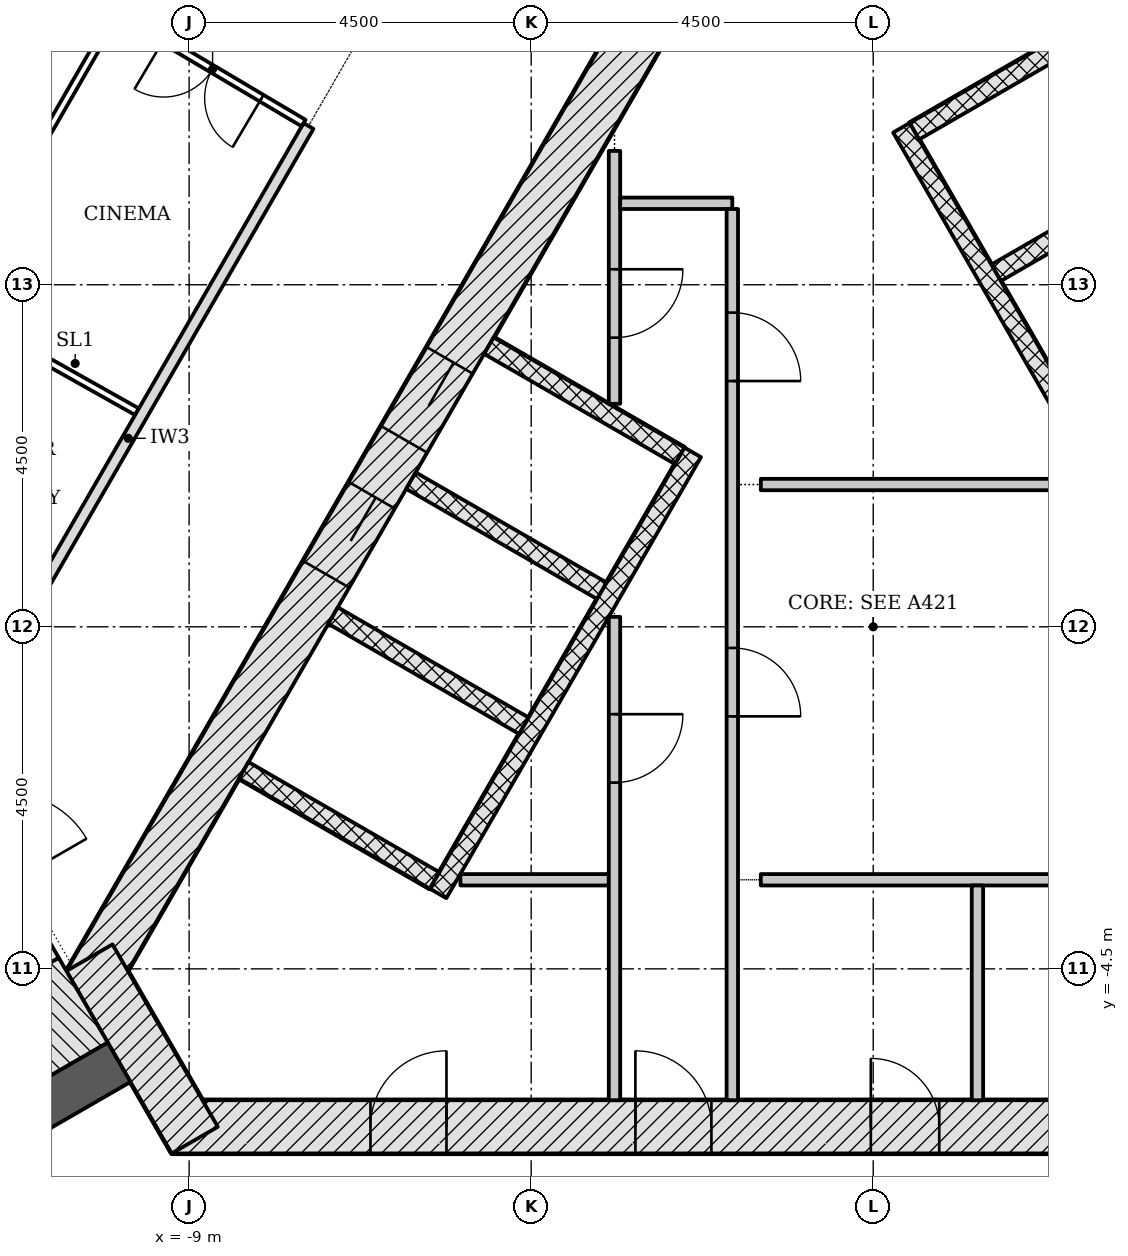
"""IFC4 building model, lengths in metres.
Left out: names, types, materials, properties, quantities, classifications, styles, units other than length and angle.
Written with IfcOpenShell. Run it as: python <this file> out.ifc"""

import sys

from ifc_helpers import new_model, si_unit, direction, frame, frame_2d, origin, place, context, subcontext, project, spatial, rectangle, extrude, element, fill, save


model = new_model("IFC4")
c1 = context("Model", 3, precision=1e-05, world=origin(), true_north=direction((0.0, 1.0)))
c2 = subcontext(c1, "Body", "Model", "MODEL_VIEW")
j1 = project(units=[si_unit("LENGTHUNIT", "METRE"), si_unit("PLANEANGLEUNIT", "RADIAN")], contexts=[c1])
p1 = place(None, origin())
s1 = spatial("IfcSite", under=j1, at=p1, CompositionType="ELEMENT")
p2 = place(p1, origin())
s2 = spatial("IfcBuilding", under=s1, at=p2, CompositionType="ELEMENT")
p3 = place(p2, frame((0.0, 0.0, 263.4)))
s3 = spatial("IfcBuildingStorey", under=s2, at=p3, CompositionType="ELEMENT", Elevation=263.4)
p4 = place(p3, frame((-9.229, -6.578, -0.2), z_axis=(0.0, 0.0, 1.0), x_axis=(1.0, 0.0, 0.0)))
e1 = element("IfcWall", 1, at=p4, inside=s3, PredefinedType="SHEAR", context=c2, shape_type="SweptSolid", body=[
    extrude(rectangle(XDim=18.458, YDim=0.7, at=frame_2d((9.229, 0.0))), origin(), (0.0, 0.0, 1.0), 3.6),
])
p5 = place(p4, frame((6.1, 0.0, 0.2)))
e2 = element("IfcOpeningElement", 2, at=p5, cuts=e1, PredefinedType="OPENING", context=c2, shape_type="SweptSolid", body=[
    extrude(rectangle(XDim=1.0, YDim=2.1, at=frame_2d((0.5, 1.05))), frame((0.0, 0.36, 0.0), z_axis=(0.0, -1.0, 0.0), x_axis=(1.0, 0.0, 0.0)), (0.0, 0.0, 1.0), 0.72),
])
p6 = place(p4, frame((2.615, 0.0, 0.2)))
e3 = element("IfcOpeningElement", 3, at=p6, cuts=e1, PredefinedType="OPENING", context=c2, shape_type="SweptSolid", body=[
    extrude(rectangle(XDim=1.0, YDim=2.1, at=frame_2d((0.5, 1.05))), frame((0.0, 0.36, 0.0), z_axis=(0.0, -1.0, 0.0), x_axis=(1.0, 0.0, 0.0)), (0.0, 0.0, 1.0), 0.72),
])
p7 = place(p4, frame((9.198, 0.0, 0.2)))
e4 = element("IfcOpeningElement", 4, at=p7, cuts=e1, PredefinedType="OPENING", context=c2, shape_type="SweptSolid", body=[
    extrude(rectangle(XDim=0.9, YDim=2.1, at=frame_2d((0.45, 1.05))), frame((0.0, 0.36, 0.0), z_axis=(0.0, -1.0, 0.0), x_axis=(1.0, 0.0, 0.0)), (0.0, 0.0, 1.0), 0.72),
])
p8 = place(p4, frame((13.877, 0.0, 0.2)))
e5 = element("IfcOpeningElement", 5, at=p8, cuts=e1, PredefinedType="OPENING", context=c2, shape_type="SweptSolid", body=[
    extrude(rectangle(XDim=0.9, YDim=2.1, at=frame_2d((0.45, 1.05))), frame((0.0, 0.36, 0.0), z_axis=(0.0, -1.0, 0.0), x_axis=(1.0, 0.0, 0.0)), (0.0, 0.0, 1.0), 0.72),
])
p9 = place(p3, frame((10.311, -4.703, -0.2), z_axis=(0.0, 0.0, 1.0), x_axis=(-0.500001446645, 0.866024568562, 0.0)))
e6 = element("IfcWall", 6, at=p9, inside=s3, PredefinedType="SHEAR", context=c2, shape_type="SweptSolid", body=[
    extrude(rectangle(XDim=18.458, YDim=0.7, at=frame_2d((9.229, 0.0))), origin(), (0.0, 0.0, 1.0), 3.6),
])
p10 = place(p9, frame((4.379, 0.0, 0.2)))
e7 = element("IfcOpeningElement", 7, at=p10, cuts=e6, PredefinedType="OPENING", context=c2, shape_type="SweptSolid", body=[
    extrude(rectangle(XDim=1.1, YDim=2.1, at=frame_2d((0.55, 1.05))), frame((0.0, 0.36, 0.0), z_axis=(0.0, -1.0, 0.0), x_axis=(1.0, 0.0, 0.0)), (0.0, 0.0, 1.0), 0.72),
])
p11 = place(p9, frame((6.529, 0.0, 0.2)))
e8 = element("IfcOpeningElement", 8, at=p11, cuts=e6, PredefinedType="OPENING", context=c2, shape_type="SweptSolid", body=[
    extrude(rectangle(XDim=1.1, YDim=2.1, at=frame_2d((0.55, 1.05))), frame((0.0, 0.36, 0.0), z_axis=(0.0, -1.0, 0.0), x_axis=(1.0, 0.0, 0.0)), (0.0, 0.0, 1.0), 0.72),
])
p12 = place(p9, frame((8.679, 0.0, 0.2)))
e9 = element("IfcOpeningElement", 9, at=p12, cuts=e6, PredefinedType="OPENING", context=c2, shape_type="SweptSolid", body=[
    extrude(rectangle(XDim=1.1, YDim=2.1, at=frame_2d((0.55, 1.05))), frame((0.0, 0.36, 0.0), z_axis=(0.0, -1.0, 0.0), x_axis=(1.0, 0.0, 0.0)), (0.0, 0.0, 1.0), 0.72),
])
p13 = place(p9, frame((10.829, 0.0, 0.2)))
e10 = element("IfcOpeningElement", 10, at=p13, cuts=e6, PredefinedType="OPENING", context=c2, shape_type="SweptSolid", body=[
    extrude(rectangle(XDim=1.1, YDim=2.1, at=frame_2d((0.55, 1.05))), frame((0.0, 0.36, 0.0), z_axis=(0.0, -1.0, 0.0), x_axis=(1.0, 0.0, 0.0)), (0.0, 0.0, 1.0), 0.72),
])
p14 = place(p9, frame((12.979, 0.0, 0.2)))
e11 = element("IfcOpeningElement", 11, at=p14, cuts=e6, PredefinedType="OPENING", context=c2, shape_type="SweptSolid", body=[
    extrude(rectangle(XDim=1.1, YDim=2.1, at=frame_2d((0.55, 1.05))), frame((0.0, 0.36, 0.0), z_axis=(0.0, -1.0, 0.0), x_axis=(1.0, 0.0, 0.0)), (0.0, 0.0, 1.0), 0.72),
])
p15 = place(p3, frame((-1.083, 11.281, -0.2), z_axis=(0.0, 0.0, 1.0), x_axis=(-0.500001446645, -0.866024568562, 0.0)))
e12 = element("IfcWall", 12, at=p15, inside=s3, PredefinedType="SHEAR", context=c2, shape_type="SweptSolid", body=[
    extrude(rectangle(XDim=18.458, YDim=0.7, at=frame_2d((9.229, 0.0))), origin(), (0.0, 0.0, 1.0), 3.6),
])
p16 = place(p15, frame((8.979, 0.0, 0.2)))
e13 = element("IfcOpeningElement", 13, at=p16, cuts=e12, PredefinedType="OPENING", context=c2, shape_type="SweptSolid", body=[
    extrude(rectangle(XDim=1.2, YDim=2.1, at=frame_2d((0.6, 1.05))), frame((0.0, 0.36, 0.0), z_axis=(0.0, -1.0, 0.0), x_axis=(1.0, 0.0, 0.0)), (0.0, 0.0, 1.0), 0.72),
])
p17 = place(p15, frame((11.029, 0.0, 0.2)))
e14 = element("IfcOpeningElement", 14, at=p17, cuts=e12, PredefinedType="OPENING", context=c2, shape_type="SweptSolid", body=[
    extrude(rectangle(XDim=1.2, YDim=2.1, at=frame_2d((0.6, 1.05))), frame((0.0, 0.36, 0.0), z_axis=(0.0, -1.0, 0.0), x_axis=(1.0, 0.0, 0.0)), (0.0, 0.0, 1.0), 0.72),
])
p18 = place(p3, frame((-10.311, -4.353, -0.2), z_axis=(0.0, 0.0, 1.0), x_axis=(0.500042739161, -0.866000726912, 0.0)))
e15 = element("IfcWall", 15, at=p18, inside=s3, PredefinedType="SHEAR", context=c2, shape_type="SweptSolid", body=[
    extrude(rectangle(XDim=2.771, YDim=0.7, at=frame_2d((1.386, 0.0))), origin(), (0.0, 0.0, 1.0), 3.6),
])
p19 = place(p3, frame((-9.922, -5.728, -0.2), z_axis=(0.0, 0.0, 1.0), x_axis=(-0.866032176823, -0.499988268569, 0.0)))
e16 = element("IfcWall", 16, at=p19, inside=s3, PredefinedType="SHEAR", context=c2, shape_type="SweptSolid", body=[
    extrude(rectangle(XDim=6.678, YDim=0.6, at=frame_2d((3.339, 0.0))), origin(), (0.0, 0.0, 1.0), 3.6),
])
for number, where, z_axis, x_axis in (
    (17, (3.781, 5.907, -0.2), (0.0, 0.0, 1.0), (-0.866, -0.5, 0.0)),
    (18, (2.706, 7.769, -0.2), (0.0, 0.0, 1.0), (-0.866, -0.5, 0.0)),
):
    element("IfcWall", number, at=place(p3, frame(where, z_axis=z_axis, x_axis=x_axis)), inside=s3, PredefinedType="PARTITIONING", context=c2, shape_type="SweptSolid", body=[
        extrude(rectangle(XDim=2.5, YDim=0.25, at=frame_2d((1.25, 0.0))), origin(), (0.0, 0.0, 1.0), 3.6),
    ])
p20 = place(p3, frame((5.87, -2.961, 0.0), z_axis=(0.0, 0.0, 1.0), x_axis=(-0.50000615651, 0.866021849293, 0.0)))
e19 = element("IfcWall", 19, at=p20, inside=s3, PredefinedType="PARTITIONING", context=c2, shape_type="SweptSolid", body=[
    extrude(rectangle(XDim=11.0, YDim=0.25, at=frame_2d((5.5, 0.0))), origin(), (0.0, 0.0, 1.0), 3.4),
])
for number, where, z_axis, x_axis in (
    (20, (-5.056, 3.699, -0.2), (0.0, 0.0, 1.0), (0.866, -0.5, 0.0)),
    (21, (-6.081, 1.923, -0.2), (0.0, 0.0, 1.0), (0.866, -0.5, 0.0)),
    (22, (-7.106, 0.148, -0.2), (0.0, 0.0, 1.0), (0.866, -0.5, 0.0)),
    (23, (-8.281, -1.887, -0.2), (0.0, 0.0, 1.0), (0.866, -0.5, 0.0)),
):
    element("IfcWall", number, at=place(p3, frame(where, z_axis=z_axis, x_axis=x_axis)), inside=s3, PredefinedType="PARTITIONING", context=c2, shape_type="SweptSolid", body=[
        extrude(rectangle(XDim=2.9, YDim=0.25, at=frame_2d((1.45, 0.0))), origin(), (0.0, 0.0, 1.0), 3.6),
    ])
p21 = place(p3, frame((-2.374, 2.294, 0.0), z_axis=(0.0, 0.0, 1.0), x_axis=(-0.500003174267, -0.866023571113, 0.0)))
e24 = element("IfcWall", 24, at=p21, inside=s3, PredefinedType="PARTITIONING", context=c2, shape_type="SweptSolid", body=[
    extrude(rectangle(XDim=6.7, YDim=0.25, at=frame_2d((3.35, 0.0))), origin(), (0.0, 0.0, 1.0), 3.4),
])
p22 = place(p3, frame((-5.431, -3.328, 0.0), z_axis=(0.0, 0.0, 1.0), x_axis=(1.0, 0.0, 0.0)))
e25 = element("IfcWall", 25, at=p22, inside=s3, PredefinedType="PARTITIONING", context=c2, shape_type="SweptSolid", body=[
    extrude(rectangle(XDim=1.952, YDim=0.15, at=frame_2d((0.976, 0.0))), origin(), (0.0, 0.0, 1.0), 3.4),
])
p23 = place(p3, frame((-3.404, 0.131, 0.0), z_axis=(0.0, 0.0, 1.0), x_axis=(0.0, -1.0, 0.0)))
e26 = element("IfcWall", 26, at=p23, inside=s3, PredefinedType="PARTITIONING", context=c2, shape_type="SweptSolid", body=[
    extrude(rectangle(XDim=6.359, YDim=0.15, at=frame_2d((3.18, 0.0))), origin(), (0.0, 0.0, 1.0), 3.4),
])
p24 = place(p23, frame((1.281, 0.0, 0.0)))
e27 = element("IfcOpeningElement", 27, at=p24, cuts=e26, PredefinedType="OPENING", context=c2, shape_type="SweptSolid", body=[
    extrude(rectangle(XDim=0.9, YDim=2.1, at=frame_2d((0.45, 1.05))), frame((0.0, 0.085, 0.0), z_axis=(0.0, -1.0, 0.0), x_axis=(1.0, 0.0, 0.0)), (0.0, 0.0, 1.0), 0.17),
])
p25 = place(p3, frame((-3.404, 6.261, 0.0), z_axis=(0.0, 0.0, 1.0), x_axis=(0.0, -1.0, 0.0)))
e28 = element("IfcWall", 28, at=p25, inside=s3, PredefinedType="PARTITIONING", context=c2, shape_type="SweptSolid", body=[
    extrude(rectangle(XDim=3.327, YDim=0.15, at=frame_2d((1.664, 0.0))), origin(), (0.0, 0.0, 1.0), 3.4),
])
p26 = place(p25, frame((1.557, 0.0, 0.0)))
e29 = element("IfcOpeningElement", 29, at=p26, cuts=e28, PredefinedType="OPENING", context=c2, shape_type="SweptSolid", body=[
    extrude(rectangle(XDim=0.9, YDim=2.1, at=frame_2d((0.45, 1.05))), frame((0.0, 0.085, 0.0), z_axis=(0.0, -1.0, 0.0), x_axis=(1.0, 0.0, 0.0)), (0.0, 0.0, 1.0), 0.17),
])
p27 = place(p3, frame((-3.329, 5.572, 0.0), z_axis=(0.0, 0.0, 1.0), x_axis=(1.0, 0.0, 0.0)))
e30 = element("IfcWall", 30, at=p27, inside=s3, PredefinedType="PARTITIONING", context=c2, shape_type="SweptSolid", body=[
    extrude(rectangle(XDim=1.475, YDim=0.15, at=frame_2d((0.737, 0.0))), origin(), (0.0, 0.0, 1.0), 3.4),
])
p28 = place(p3, frame((-1.854, 5.497, 0.0), z_axis=(0.0, 0.0, 1.0), x_axis=(0.0, -1.0, 0.0)))
e31 = element("IfcWall", 31, at=p28, inside=s3, PredefinedType="PARTITIONING", context=c2, shape_type="SweptSolid", body=[
    extrude(rectangle(XDim=11.725, YDim=0.15, at=frame_2d((5.863, 0.0))), origin(), (0.0, 0.0, 1.0), 3.4),
])
p29 = place(p28, frame((5.775, 0.0, 0.0)))
e32 = element("IfcOpeningElement", 32, at=p29, cuts=e31, PredefinedType="OPENING", context=c2, shape_type="SweptSolid", body=[
    extrude(rectangle(XDim=0.9, YDim=2.1, at=frame_2d((0.45, 1.05))), frame((0.0, 0.085, 0.0), z_axis=(0.0, -1.0, 0.0), x_axis=(1.0, 0.0, 0.0)), (0.0, 0.0, 1.0), 0.17),
])
p30 = place(p28, frame((1.364, 0.0, 0.0)))
e33 = element("IfcOpeningElement", 33, at=p30, cuts=e31, PredefinedType="OPENING", context=c2, shape_type="SweptSolid", body=[
    extrude(rectangle(XDim=0.9, YDim=2.1, at=frame_2d((0.45, 1.05))), frame((0.0, 0.085, 0.0), z_axis=(0.0, -1.0, 0.0), x_axis=(1.0, 0.0, 0.0)), (0.0, 0.0, 1.0), 0.17),
])
p31 = place(p3, frame((-1.479, -3.328, 0.0), z_axis=(0.0, 0.0, 1.0), x_axis=(1.0, 0.0, 0.0)))
e34 = element("IfcWall", 34, at=p31, inside=s3, PredefinedType="PARTITIONING", context=c2, shape_type="SweptSolid", body=[
    extrude(rectangle(XDim=10.547, YDim=0.15, at=frame_2d((5.273, 0.0))), origin(), (0.0, 0.0, 1.0), 3.4),
])
p32 = place(p3, frame((-1.479, 1.872, 0.0), z_axis=(0.0, 0.0, 1.0), x_axis=(1.0, 0.0, 0.0)))
e35 = element("IfcWall", 35, at=p32, inside=s3, PredefinedType="PARTITIONING", context=c2, shape_type="SweptSolid", body=[
    extrude(rectangle(XDim=4.369, YDim=0.15, at=frame_2d((2.185, 0.0))), origin(), (0.0, 0.0, 1.0), 3.4),
])
p33 = place(p3, frame((1.371, -3.403, 0.0), z_axis=(0.0, 0.0, 1.0), x_axis=(0.0, -1.0, 0.0)))
e36 = element("IfcWall", 36, at=p33, inside=s3, PredefinedType="PARTITIONING", context=c2, shape_type="SweptSolid", body=[
    extrude(rectangle(XDim=2.825, YDim=0.15, at=frame_2d((1.413, 0.0))), origin(), (0.0, 0.0, 1.0), 3.4),
])
p34 = place(p3, frame((-12.576, -1.331, -0.2), z_axis=(0.0, 0.0, 1.0), x_axis=(0.499970499736, -0.8660424351, 0.0)))
e37 = element("IfcWall", 37, at=p34, inside=s3, PredefinedType="SHEAR", context=c2, shape_type="SweptSolid", body=[
    extrude(rectangle(XDim=3.55, YDim=0.2, at=frame_2d((1.775, 0.0))), origin(), (0.0, 0.0, 1.0), 3.6),
])
p35 = place(p34, frame((1.175, 0.0, 0.2)))
e38 = element("IfcOpeningElement", 38, at=p35, cuts=e37, PredefinedType="OPENING", context=c2, shape_type="SweptSolid", body=[
    extrude(rectangle(XDim=1.2, YDim=2.1, at=frame_2d((0.6, 1.05))), frame((0.0, 0.11, 0.0), z_axis=(0.0, -1.0, 0.0), x_axis=(1.0, 0.0, 0.0)), (0.0, 0.0, 1.0), 0.22),
])
p36 = place(p3, frame((-10.393, -4.912, -0.2), z_axis=(0.0, 0.0, 1.0), x_axis=(-0.866025486527, -0.499999856685, 0.0)))
e39 = element("IfcWall", 39, at=p36, inside=s3, PredefinedType="SHEAR", context=c2, shape_type="SweptSolid", body=[
    extrude(rectangle(XDim=6.679, YDim=1.286, at=frame_2d((3.339, 0.0))), origin(), (0.0, 0.0, 1.0), 3.6),
])
p37 = place(p3, frame((-7.429, 6.589, 0.0), z_axis=(0.0, 0.0, 1.0), x_axis=(-0.499994197604, -0.866028753773, 0.0)))
e40 = element("IfcWall", 40, at=p37, inside=s3, PredefinedType="PARTITIONING", context=c2, shape_type="SweptSolid", body=[
    extrude(rectangle(XDim=9.488, YDim=0.15, at=frame_2d((4.744, 0.0))), origin(), (0.0, 0.0, 1.0), 2.852),
])
p38 = place(p3, frame((-7.494, 6.627, 0.0), z_axis=(0.0, 0.0, 1.0), x_axis=(-0.860170843297, 0.510006000299, 0.0)))
e41 = element("IfcWall", 41, at=p38, inside=s3, PredefinedType="PARTITIONING", context=c2, shape_type="SweptSolid", body=[
    extrude(rectangle(XDim=2.859, YDim=0.1, at=frame_2d((1.43, 0.0))), origin(), (0.0, 0.0, 1.0), 3.4),
])
p39 = place(p38, frame((0.642, 0.0, 0.0)))
e42 = element("IfcOpeningElement", 42, at=p39, cuts=e41, PredefinedType="OPENING", context=c2, shape_type="SweptSolid", body=[
    extrude(rectangle(XDim=1.5, YDim=2.1, at=frame_2d((0.75, 1.05))), frame((0.0, 0.06, 0.0), z_axis=(0.0, -1.0, 0.0), x_axis=(1.0, 0.0, 0.0)), (0.0, 0.0, 1.0), 0.12),
])
p40 = place(p3, frame((-9.686, 2.83, 0.0), z_axis=(0.0, 0.0, 1.0), x_axis=(-0.871778429479, 0.489900367315, 0.0)))
e43 = element("IfcWall", 43, at=p40, inside=s3, PredefinedType="PARTITIONING", context=c2, shape_type="SweptSolid", body=[
    extrude(rectangle(XDim=2.859, YDim=0.1, at=frame_2d((1.43, 0.0))), origin(), (0.0, 0.0, 1.0), 3.4),
])
p41 = place(p3, frame((-9.978, 8.042, 0.0), z_axis=(0.0, 0.0, 1.0), x_axis=(-0.500007404367, -0.866021128829, 0.0)))
e44 = element("IfcWall", 44, at=p41, inside=s3, PredefinedType="PARTITIONING", context=c2, shape_type="SweptSolid", body=[
    extrude(rectangle(XDim=4.351, YDim=0.1, at=frame_2d((2.176, 0.0))), origin(), (0.0, 0.0, 1.0), 2.852),
])
p42 = place(p16, origin())
e45 = element("IfcDoor", 45, at=p42, inside=s3, OperationType="DOUBLE_DOOR_SLIDING", PredefinedType="DOOR", context=c2, shape_type="SweptSolid", body=[
    extrude(rectangle(XDim=1.2, YDim=2.1, at=frame_2d((0.6, 1.05))), frame((0.0, 0.025, 0.0), z_axis=(0.0, -1.0, 0.0), x_axis=(1.0, 0.0, 0.0)), (0.0, 0.0, 1.0), 0.05),
])
fill(e13, e45)
p43 = place(p17, origin())
e46 = element("IfcDoor", 46, at=p43, inside=s3, OperationType="DOUBLE_DOOR_SLIDING", PredefinedType="DOOR", context=c2, shape_type="SweptSolid", body=[
    extrude(rectangle(XDim=1.2, YDim=2.1, at=frame_2d((0.6, 1.05))), frame((0.0, 0.025, 0.0), z_axis=(0.0, -1.0, 0.0), x_axis=(1.0, 0.0, 0.0)), (0.0, 0.0, 1.0), 0.05),
])
fill(e14, e46)
p44 = place(p5, origin())
e47 = element("IfcDoor", 47, at=p44, inside=s3, OperationType="SINGLE_SWING_LEFT", PredefinedType="DOOR", context=c2, shape_type="SweptSolid", body=[
    extrude(rectangle(XDim=1.0, YDim=2.1, at=frame_2d((0.5, 1.05))), frame((0.0, 0.075, 0.0), z_axis=(0.0, -1.0, 0.0), x_axis=(1.0, 0.0, 0.0)), (0.0, 0.0, 1.0), 0.15),
])
fill(e2, e47)
p45 = place(p6, origin())
e48 = element("IfcDoor", 48, at=p45, inside=s3, OperationType="SINGLE_SWING_RIGHT", PredefinedType="DOOR", context=c2, shape_type="SweptSolid", body=[
    extrude(rectangle(XDim=1.0, YDim=2.1, at=frame_2d((0.5, 1.05))), frame((0.0, 0.075, 0.0), z_axis=(0.0, -1.0, 0.0), x_axis=(1.0, 0.0, 0.0)), (0.0, 0.0, 1.0), 0.15),
])
fill(e3, e48)
p46 = place(p7, origin())
e49 = element("IfcDoor", 49, at=p46, inside=s3, OperationType="SINGLE_SWING_LEFT", PredefinedType="DOOR", context=c2, shape_type="SweptSolid", body=[
    extrude(rectangle(XDim=0.9, YDim=2.1, at=frame_2d((0.45, 1.05))), frame((0.0, 0.075, 0.0), z_axis=(0.0, -1.0, 0.0), x_axis=(1.0, 0.0, 0.0)), (0.0, 0.0, 1.0), 0.15),
])
fill(e4, e49)
p47 = place(p24, origin())
e50 = element("IfcDoor", 50, at=p47, inside=s3, OperationType="SINGLE_SWING_LEFT", PredefinedType="DOOR", context=c2, shape_type="SweptSolid", body=[
    extrude(rectangle(XDim=0.9, YDim=2.1, at=frame_2d((0.45, 1.05))), frame((0.0, 0.025, 0.0), z_axis=(0.0, -1.0, 0.0), x_axis=(1.0, 0.0, 0.0)), (0.0, 0.0, 1.0), 0.05),
])
fill(e27, e50)
p48 = place(p29, origin())
e51 = element("IfcDoor", 51, at=p48, inside=s3, OperationType="SINGLE_SWING_RIGHT", PredefinedType="DOOR", context=c2, shape_type="SweptSolid", body=[
    extrude(rectangle(XDim=0.9, YDim=2.1, at=frame_2d((0.45, 1.05))), frame((0.0, 0.025, 0.0), z_axis=(0.0, -1.0, 0.0), x_axis=(1.0, 0.0, 0.0)), (0.0, 0.0, 1.0), 0.05),
])
fill(e32, e51)
p49 = place(p26, origin())
e52 = element("IfcDoor", 52, at=p49, inside=s3, OperationType="SINGLE_SWING_LEFT", PredefinedType="DOOR", context=c2, shape_type="SweptSolid", body=[
    extrude(rectangle(XDim=0.9, YDim=2.1, at=frame_2d((0.45, 1.05))), frame((0.0, 0.025, 0.0), z_axis=(0.0, -1.0, 0.0), x_axis=(1.0, 0.0, 0.0)), (0.0, 0.0, 1.0), 0.05),
])
fill(e29, e52)
p50 = place(p30, origin())
e53 = element("IfcDoor", 53, at=p50, inside=s3, OperationType="SINGLE_SWING_RIGHT", PredefinedType="DOOR", context=c2, shape_type="SweptSolid", body=[
    extrude(rectangle(XDim=0.9, YDim=2.1, at=frame_2d((0.45, 1.05))), frame((0.0, 0.025, 0.0), z_axis=(0.0, -1.0, 0.0), x_axis=(1.0, 0.0, 0.0)), (0.0, 0.0, 1.0), 0.05),
])
fill(e33, e53)
p51 = place(p39, origin())
e54 = element("IfcDoor", 54, at=p51, inside=s3, OperationType="DOUBLE_DOOR_SINGLE_SWING", PredefinedType="DOOR", context=c2, shape_type="SweptSolid", body=[
    extrude(rectangle(XDim=1.5, YDim=2.1, at=frame_2d((0.75, 1.05))), frame((0.0, 0.025, 0.0), z_axis=(0.0, -1.0, 0.0), x_axis=(1.0, 0.0, 0.0)), (0.0, 0.0, 1.0), 0.05),
])
fill(e42, e54)
save(model, sys.argv[1])
